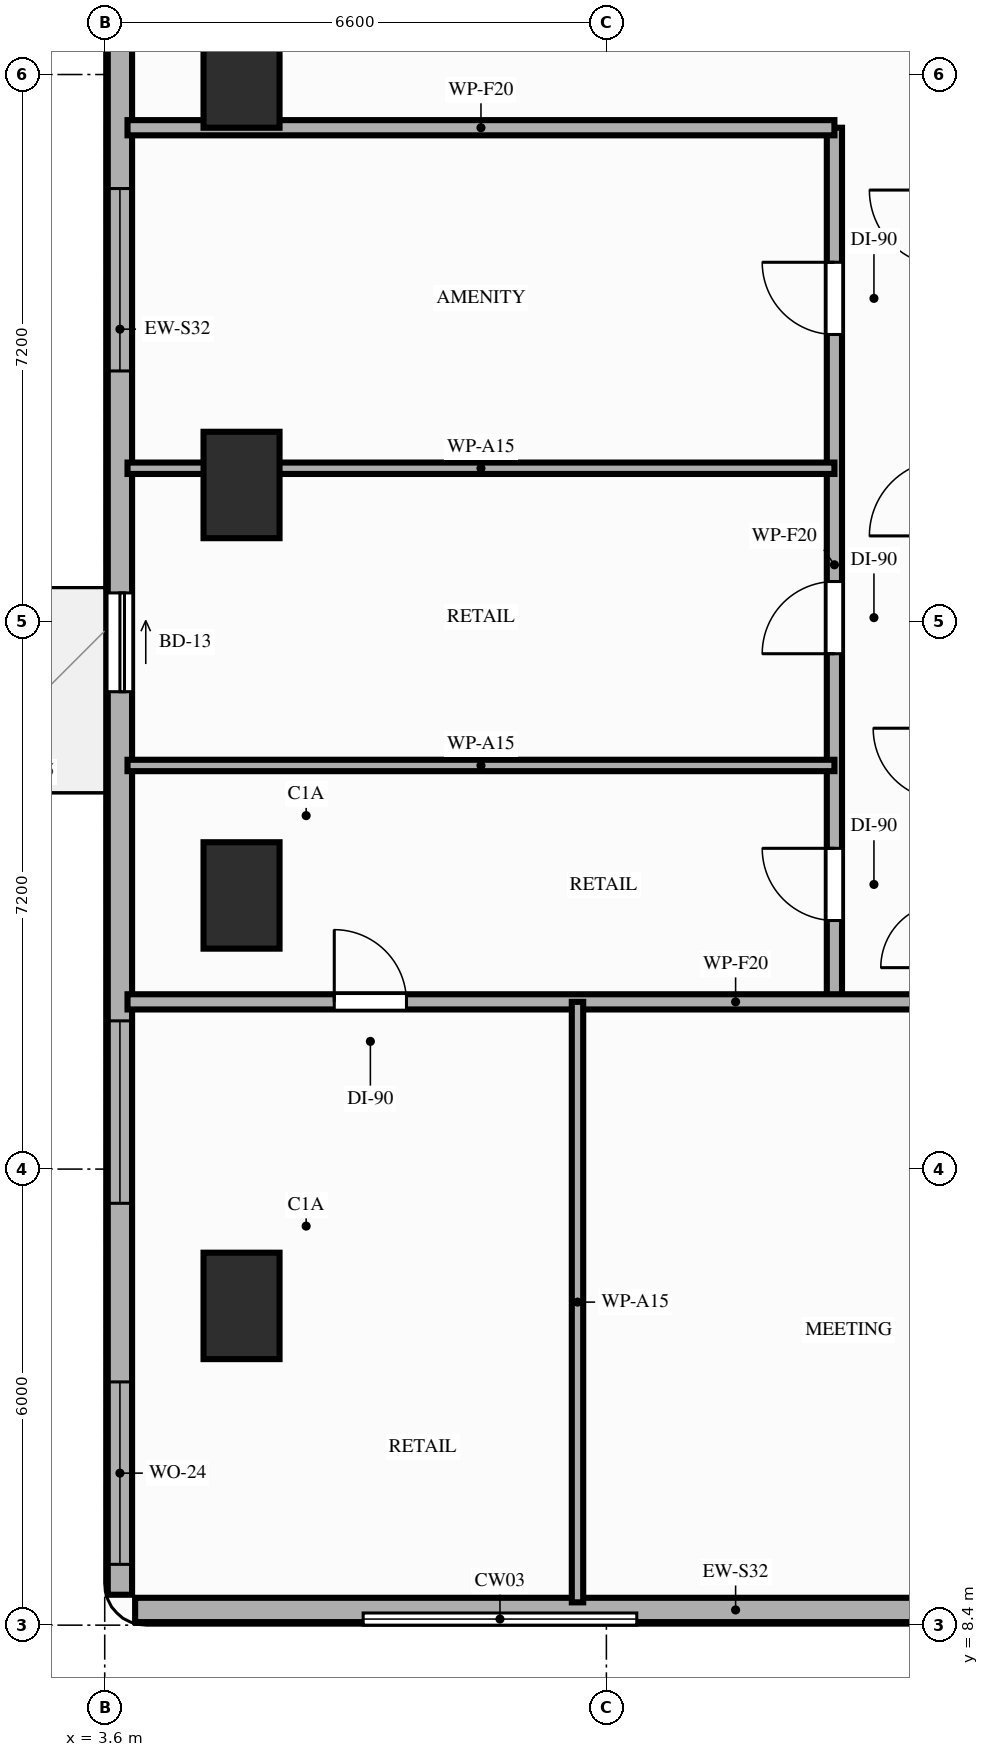
"""IFC4 building model, lengths in metres.
Left out: names, types, materials, properties, quantities, classifications, styles, units other than length and angle.
Written with IfcOpenShell. Run it as: python <this file> out.ifc"""

import sys

from ifc_helpers import new_model, si_unit, direction, frame, frame_2d, origin, origin_2d, place, context, subcontext, project, spatial, rectangle, extrude, element, fill, save


model = new_model("IFC4")
c1 = context("Model", 3, precision=1e-05, world=origin(), true_north=direction((0.0, 1.0)))
c2 = subcontext(c1, "Body", "Model", "MODEL_VIEW")
j1 = project(units=[si_unit("LENGTHUNIT", "METRE"), si_unit("PLANEANGLEUNIT", "RADIAN")], contexts=[c1])
p1 = place(None, origin())
s1 = spatial("IfcSite", under=j1, at=p1, CompositionType="ELEMENT")
p2 = place(p1, origin())
s2 = spatial("IfcBuilding", under=s1, at=p2, CompositionType="ELEMENT")
p3 = place(p2, frame((0.0, 0.0, 56.4)))
s3 = spatial("IfcBuildingStorey", under=s2, at=p3, CompositionType="ELEMENT", Elevation=56.4)
for number, where, z_axis, x_axis in (
    (1, (5.4, 12.6, 0.0), (0.0, 0.0, 1.0), (1.0, 0.0, 0.0)),
    (2, (5.4, 18.0, 0.0), (0.0, 0.0, 1.0), (1.0, 0.0, 0.0)),
    (3, (5.4, 23.4, 0.0), (0.0, 0.0, 1.0), (1.0, 0.0, 0.0)),
    (4, (5.4, 28.8, 0.0), (0.0, 0.0, 1.0), (1.0, 0.0, 0.0)),
):
    element("IfcColumn", number, at=place(p3, frame(where, z_axis=z_axis, x_axis=x_axis)), inside=s3, PredefinedType="COLUMN", context=c2, shape_type="SweptSolid", body=[
        extrude(rectangle(XDim=1.0, YDim=1.4, at=origin_2d()), origin(), (0.0, 0.0, 1.0), 3.2),
    ])
p4 = place(p3, frame((4.0, 8.6, 0.0), z_axis=(0.0, 0.0, 1.0), x_axis=(1.0, 0.0, 0.0)))
e5 = element("IfcWall", 5, at=p4, inside=s3, PredefinedType="STANDARD", context=c2, shape_type="SweptSolid", body=[
    extrude(rectangle(XDim=15.8, YDim=0.32, at=frame_2d((7.9, 0.0))), origin(), (0.0, 0.0, 1.0), 3.02),
])
p5 = place(p4, frame((11.2, 0.0, 0.85)))
e6 = element("IfcOpeningElement", 6, at=p5, cuts=e5, PredefinedType="OPENING", context=c2, shape_type="SweptSolid", body=[
    extrude(rectangle(XDim=2.4, YDim=1.8, at=frame_2d((1.2, 0.9))), frame((0.0, 0.17, 0.0), z_axis=(0.0, -1.0, 0.0), x_axis=(1.0, 0.0, 0.0)), (0.0, 0.0, 1.0), 0.34),
])
p6 = place(p3, frame((3.8, 42.1, 0.0), z_axis=(0.0, 0.0, 1.0), x_axis=(0.0, -1.0, 0.0)))
e7 = element("IfcWall", 7, at=p6, inside=s3, PredefinedType="STANDARD", context=c2, shape_type="SweptSolid", body=[
    extrude(rectangle(XDim=33.3, YDim=0.32, at=frame_2d((16.65, 0.0))), origin(), (0.0, 0.0, 1.0), 2.7),
])
p7 = place(p6, frame((20.12, 0.0, 0.0)))
e8 = element("IfcOpeningElement", 8, at=p7, cuts=e7, PredefinedType="OPENING", context=c2, shape_type="SweptSolid", body=[
    extrude(rectangle(XDim=1.3, YDim=2.08, at=frame_2d((0.65, 1.04))), frame((0.0, 0.17, 0.0), z_axis=(0.0, -1.0, 0.0), x_axis=(1.0, 0.0, 0.0)), (0.0, 0.0, 1.0), 0.34),
])
p8 = place(p6, frame((30.5, 0.0, 0.85)))
e9 = element("IfcOpeningElement", 9, at=p8, cuts=e7, PredefinedType="OPENING", context=c2, shape_type="SweptSolid", body=[
    extrude(rectangle(XDim=2.4, YDim=1.6, at=frame_2d((1.2, 0.8))), frame((0.0, 0.17, 0.0), z_axis=(0.0, -1.0, 0.0), x_axis=(1.0, 0.0, 0.0)), (0.0, 0.0, 1.0), 0.34),
])
p9 = place(p6, frame((25.75, 0.0, 0.85)))
e10 = element("IfcOpeningElement", 10, at=p9, cuts=e7, PredefinedType="OPENING", context=c2, shape_type="SweptSolid", body=[
    extrude(rectangle(XDim=2.4, YDim=1.6, at=frame_2d((1.2, 0.8))), frame((0.0, 0.17, 0.0), z_axis=(0.0, -1.0, 0.0), x_axis=(1.0, 0.0, 0.0)), (0.0, 0.0, 1.0), 0.34),
])
p10 = place(p6, frame((14.8, 0.0, 0.85)))
e11 = element("IfcOpeningElement", 11, at=p10, cuts=e7, PredefinedType="OPENING", context=c2, shape_type="SweptSolid", body=[
    extrude(rectangle(XDim=2.4, YDim=1.6, at=frame_2d((1.2, 0.8))), frame((0.0, 0.17, 0.0), z_axis=(0.0, -1.0, 0.0), x_axis=(1.0, 0.0, 0.0)), (0.0, 0.0, 1.0), 0.34),
])
p11 = place(p6, frame((9.6, 0.0, 0.85)))
e12 = element("IfcOpeningElement", 12, at=p11, cuts=e7, PredefinedType="OPENING", context=c2, shape_type="SweptSolid", body=[
    extrude(rectangle(XDim=2.4, YDim=1.6, at=frame_2d((1.2, 0.8))), frame((0.0, 0.17, 0.0), z_axis=(0.0, -1.0, 0.0), x_axis=(1.0, 0.0, 0.0)), (0.0, 0.0, 1.0), 0.34),
])
p12 = place(p6, frame((3.5, 0.0, 0.85)))
e13 = element("IfcOpeningElement", 13, at=p12, cuts=e7, PredefinedType="OPENING", context=c2, shape_type="SweptSolid", body=[
    extrude(rectangle(XDim=2.4, YDim=1.6, at=frame_2d((1.2, 0.8))), frame((0.0, 0.17, 0.0), z_axis=(0.0, -1.0, 0.0), x_axis=(1.0, 0.0, 0.0)), (0.0, 0.0, 1.0), 0.34),
])
p13 = place(p3, frame((13.2, 16.6, 0.0), z_axis=(0.0, 0.0, 1.0), x_axis=(0.0, 1.0, 0.0)))
e14 = element("IfcWall", 14, at=p13, inside=s3, PredefinedType="PARTITIONING", context=c2, shape_type="SweptSolid", body=[
    extrude(rectangle(XDim=11.5, YDim=0.2, at=frame_2d((5.75, 0.0))), origin(), (0.0, 0.0, 1.0), 2.4),
])
p14 = place(p13, frame((1.07, 0.0, 0.0)))
e15 = element("IfcOpeningElement", 15, at=p14, cuts=e14, PredefinedType="OPENING", context=c2, shape_type="SweptSolid", body=[
    extrude(rectangle(XDim=0.95, YDim=2.15, at=frame_2d((0.475, 1.075))), frame((0.0, 0.11, 0.0), z_axis=(0.0, -1.0, 0.0), x_axis=(1.0, 0.0, 0.0)), (0.0, 0.0, 1.0), 0.22),
])
p15 = place(p13, frame((4.58, 0.0, 0.0)))
e16 = element("IfcOpeningElement", 16, at=p15, cuts=e14, PredefinedType="OPENING", context=c2, shape_type="SweptSolid", body=[
    extrude(rectangle(XDim=0.95, YDim=2.15, at=frame_2d((0.475, 1.075))), frame((0.0, 0.11, 0.0), z_axis=(0.0, -1.0, 0.0), x_axis=(1.0, 0.0, 0.0)), (0.0, 0.0, 1.0), 0.22),
])
p16 = place(p13, frame((8.78, 0.0, 0.0)))
e17 = element("IfcOpeningElement", 17, at=p16, cuts=e14, PredefinedType="OPENING", context=c2, shape_type="SweptSolid", body=[
    extrude(rectangle(XDim=0.95, YDim=2.15, at=frame_2d((0.475, 1.075))), frame((0.0, 0.11, 0.0), z_axis=(0.0, -1.0, 0.0), x_axis=(1.0, 0.0, 0.0)), (0.0, 0.0, 1.0), 0.22),
])
p17 = place(p3, frame((3.9, 16.6, 0.0), z_axis=(0.0, 0.0, 1.0), x_axis=(1.0, 0.0, 0.0)))
e18 = element("IfcWall", 18, at=p17, inside=s3, PredefinedType="PARTITIONING", context=c2, shape_type="SweptSolid", body=[
    extrude(rectangle(XDim=16.0, YDim=0.2, at=frame_2d((8.0, 0.0))), origin(), (0.0, 0.0, 1.0), 2.4),
])
p18 = place(p17, frame((2.72, 0.0, 0.0)))
e19 = element("IfcOpeningElement", 19, at=p18, cuts=e18, PredefinedType="OPENING", context=c2, shape_type="SweptSolid", body=[
    extrude(rectangle(XDim=0.95, YDim=2.15, at=frame_2d((0.475, 1.075))), frame((0.0, 0.11, 0.0), z_axis=(0.0, -1.0, 0.0), x_axis=(1.0, 0.0, 0.0)), (0.0, 0.0, 1.0), 0.22),
])
p19 = place(p17, frame((11.12, 0.0, 0.0)))
e20 = element("IfcOpeningElement", 20, at=p19, cuts=e18, PredefinedType="OPENING", context=c2, shape_type="SweptSolid", body=[
    extrude(rectangle(XDim=0.95, YDim=2.15, at=frame_2d((0.475, 1.075))), frame((0.0, 0.11, 0.0), z_axis=(0.0, -1.0, 0.0), x_axis=(1.0, 0.0, 0.0)), (0.0, 0.0, 1.0), 0.22),
])
p20 = place(p3, frame((3.9, 28.1, 0.0), z_axis=(0.0, 0.0, 1.0), x_axis=(1.0, 0.0, 0.0)))
e21 = element("IfcWall", 21, at=p20, inside=s3, PredefinedType="PARTITIONING", context=c2, shape_type="SweptSolid", body=[
    extrude(rectangle(XDim=9.3, YDim=0.2, at=frame_2d((4.65, 0.0))), origin(), (0.0, 0.0, 1.0), 2.4),
])
for number, where, z_axis, x_axis in (
    (22, (3.9, 19.71, 0.0), (0.0, 0.0, 1.0), (1.0, 0.0, 0.0)),
    (23, (3.9, 23.62, 0.0), (0.0, 0.0, 1.0), (1.0, 0.0, 0.0)),
):
    element("IfcWall", number, at=place(p3, frame(where, z_axis=z_axis, x_axis=x_axis)), inside=s3, PredefinedType="PARTITIONING", context=c2, shape_type="SweptSolid", body=[
        extrude(rectangle(XDim=9.3, YDim=0.15, at=frame_2d((4.65, 0.0))), origin(), (0.0, 0.0, 1.0), 2.4),
    ])
p21 = place(p3, frame((9.82, 8.7, 0.0), z_axis=(0.0, 0.0, 1.0), x_axis=(0.0, 1.0, 0.0)))
e24 = element("IfcWall", 24, at=p21, inside=s3, PredefinedType="PARTITIONING", context=c2, shape_type="SweptSolid", body=[
    extrude(rectangle(XDim=7.9, YDim=0.15, at=frame_2d((3.95, 0.0))), origin(), (0.0, 0.0, 1.0), 2.4),
])
p22 = place(p7, origin())
e25 = element("IfcDoor", 25, at=p22, inside=s3, OperationType="SLIDING_TO_LEFT", PredefinedType="DOOR", context=c2, shape_type="SweptSolid", body=[
    extrude(rectangle(XDim=1.3, YDim=2.08, at=frame_2d((0.65, 1.04))), frame((0.0, 0.025, 0.0), z_axis=(0.0, -1.0, 0.0), x_axis=(1.0, 0.0, 0.0)), (0.0, 0.0, 1.0), 0.05),
])
fill(e8, e25)
p23 = place(p8, origin())
e26 = element("IfcWindow", 26, at=p23, inside=s3, PartitioningType="SINGLE_PANEL", PredefinedType="WINDOW", context=c2, shape_type="SweptSolid", body=[
    extrude(rectangle(XDim=2.4, YDim=1.6, at=frame_2d((1.2, 0.8))), frame((0.0, 0.03, 0.0), z_axis=(0.0, -1.0, 0.0), x_axis=(1.0, 0.0, 0.0)), (0.0, 0.0, 1.0), 0.06),
])
fill(e9, e26)
p24 = place(p9, origin())
e27 = element("IfcWindow", 27, at=p24, inside=s3, PartitioningType="SINGLE_PANEL", PredefinedType="WINDOW", context=c2, shape_type="SweptSolid", body=[
    extrude(rectangle(XDim=2.4, YDim=1.6, at=frame_2d((1.2, 0.8))), frame((0.0, 0.03, 0.0), z_axis=(0.0, -1.0, 0.0), x_axis=(1.0, 0.0, 0.0)), (0.0, 0.0, 1.0), 0.06),
])
fill(e10, e27)
p25 = place(p10, origin())
e28 = element("IfcWindow", 28, at=p25, inside=s3, PartitioningType="SINGLE_PANEL", PredefinedType="WINDOW", context=c2, shape_type="SweptSolid", body=[
    extrude(rectangle(XDim=2.4, YDim=1.6, at=frame_2d((1.2, 0.8))), frame((0.0, 0.03, 0.0), z_axis=(0.0, -1.0, 0.0), x_axis=(1.0, 0.0, 0.0)), (0.0, 0.0, 1.0), 0.06),
])
fill(e11, e28)
p26 = place(p14, origin())
e29 = element("IfcDoor", 29, at=p26, inside=s3, OperationType="SINGLE_SWING_RIGHT", PredefinedType="DOOR", context=c2, shape_type="SweptSolid", body=[
    extrude(rectangle(XDim=0.95, YDim=2.15, at=frame_2d((0.475, 1.075))), frame((0.0, 0.025, 0.0), z_axis=(0.0, -1.0, 0.0), x_axis=(1.0, 0.0, 0.0)), (0.0, 0.0, 1.0), 0.05),
])
fill(e15, e29)
p27 = place(p15, origin())
e30 = element("IfcDoor", 30, at=p27, inside=s3, OperationType="SINGLE_SWING_LEFT", PredefinedType="DOOR", context=c2, shape_type="SweptSolid", body=[
    extrude(rectangle(XDim=0.95, YDim=2.15, at=frame_2d((0.475, 1.075))), frame((0.0, 0.025, 0.0), z_axis=(0.0, -1.0, 0.0), x_axis=(1.0, 0.0, 0.0)), (0.0, 0.0, 1.0), 0.05),
])
fill(e16, e30)
p28 = place(p16, origin())
e31 = element("IfcDoor", 31, at=p28, inside=s3, OperationType="SINGLE_SWING_RIGHT", PredefinedType="DOOR", context=c2, shape_type="SweptSolid", body=[
    extrude(rectangle(XDim=0.95, YDim=2.15, at=frame_2d((0.475, 1.075))), frame((0.0, 0.025, 0.0), z_axis=(0.0, -1.0, 0.0), x_axis=(1.0, 0.0, 0.0)), (0.0, 0.0, 1.0), 0.05),
])
fill(e17, e31)
p29 = place(p18, origin())
e32 = element("IfcDoor", 32, at=p29, inside=s3, OperationType="SINGLE_SWING_LEFT", PredefinedType="DOOR", context=c2, shape_type="SweptSolid", body=[
    extrude(rectangle(XDim=0.95, YDim=2.15, at=frame_2d((0.475, 1.075))), frame((0.0, 0.025, 0.0), z_axis=(0.0, -1.0, 0.0), x_axis=(1.0, 0.0, 0.0)), (0.0, 0.0, 1.0), 0.05),
])
fill(e19, e32)
save(model, sys.argv[1])
